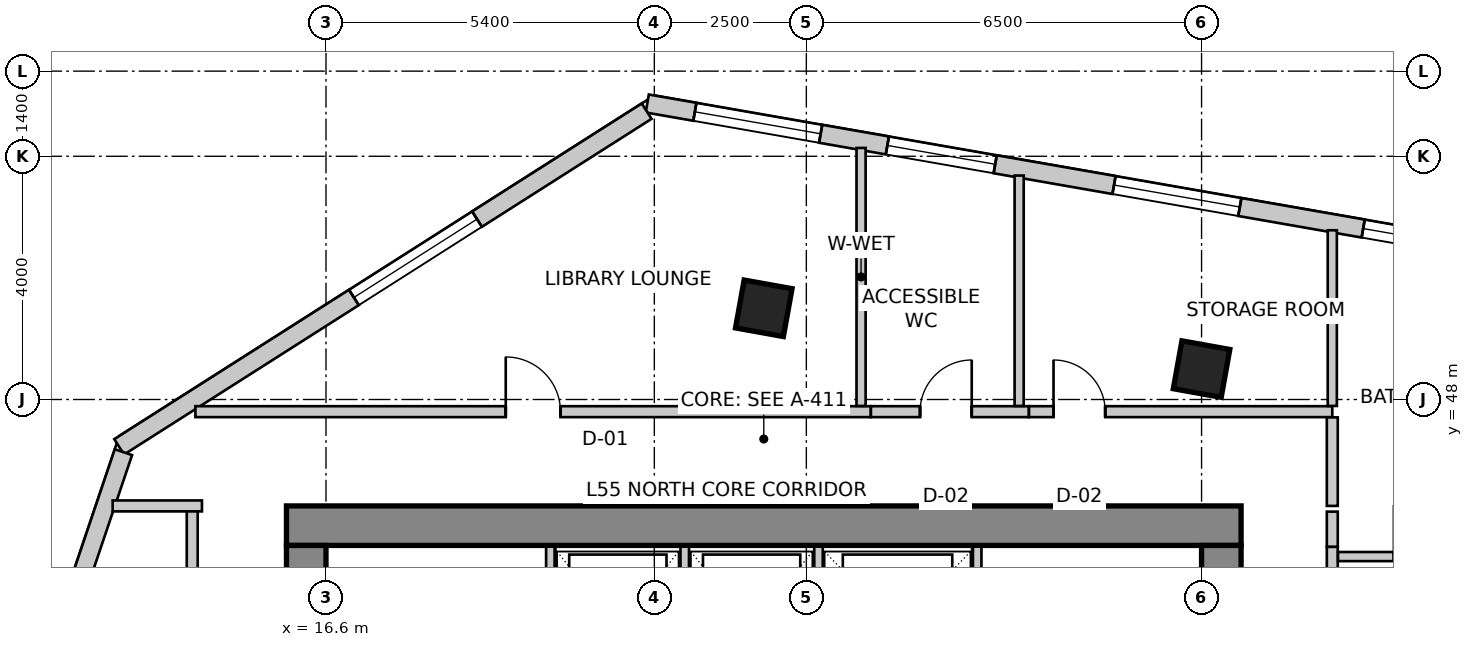
"""IFC4 building model, lengths in metres.
Left out: names, types, materials, properties, quantities, classifications, styles, units other than length and angle.
Written with IfcOpenShell. Run it as: python <this file> out.ifc"""

import sys

from ifc_helpers import new_model, si_unit, direction, frame, frame_2d, origin, origin_2d, place, context, subcontext, project, spatial, rectangle, extrude, source, transform, mapped, element, fill, save


model = new_model("IFC4")
c1 = context("Model", 3, precision=1e-05, world=origin(), true_north=direction((0.0, 1.0)))
c2 = subcontext(c1, "Body", "Model", "MODEL_VIEW")
j1 = project(units=[si_unit("LENGTHUNIT", "METRE"), si_unit("PLANEANGLEUNIT", "RADIAN")], contexts=[c1])
p1 = place(None, origin())
s1 = spatial("IfcSite", under=j1, at=p1, CompositionType="ELEMENT")
p2 = place(p1, origin())
s2 = spatial("IfcBuilding", under=s1, at=p2, CompositionType="ELEMENT")
p3 = place(p2, frame((0.0, 0.0, 218.4)))
s3 = spatial("IfcBuildingStorey", under=s2, at=p3, CompositionType="ELEMENT", Elevation=218.4)
p4 = place(p3, frame((15.95, 45.925, 0.0), z_axis=(0.0, 0.0, 1.0), x_axis=(1.0, 0.0, 0.0)))
e1 = element("IfcWall", 1, at=p4, inside=s3, PredefinedType="SHEAR", context=c2, shape_type="SweptSolid", body=[
    extrude(rectangle(XDim=15.7, YDim=0.65, at=frame_2d((7.85, 0.0))), origin(), (0.0, 0.0, 1.0), 3.5),
])
p5 = place(p3, frame((16.275, 34.2, 0.0), z_axis=(0.0, 0.0, 1.0), x_axis=(0.0, 1.0, 0.0)))
e2 = element("IfcWall", 2, at=p5, inside=s3, PredefinedType="SHEAR", context=c2, shape_type="SweptSolid", body=[
    extrude(rectangle(XDim=11.4, YDim=0.65, at=frame_2d((5.7, 0.0))), origin(), (0.0, 0.0, 1.0), 3.5),
])
m1 = source(origin(), c2, "Body", "SweptSolid", [
    extrude(rectangle(XDim=1.1, YDim=2.15, at=frame_2d((0.55, 1.075))), frame((0.0, 0.335, 0.0), z_axis=(0.0, -1.0, 0.0), x_axis=(1.0, 0.0, 0.0)), (0.0, 0.0, 1.0), 0.67),
])
p6 = place(p5, frame((7.15, 0.0, 0.0)))
e3 = element("IfcOpeningElement", 3, at=p6, cuts=e2, PredefinedType="OPENING", context=c2, shape_type="MappedRepresentation", body=[
    mapped(m1, transform((0.0, 0.0, 0.0), scale=1.0)),
])
p7 = place(p3, frame((31.325, 34.2, 0.0), z_axis=(0.0, 0.0, 1.0), x_axis=(0.0, 1.0, 0.0)))
e4 = element("IfcWall", 4, at=p7, inside=s3, PredefinedType="SHEAR", context=c2, shape_type="SweptSolid", body=[
    extrude(rectangle(XDim=11.4, YDim=0.65, at=frame_2d((5.7, 0.0))), origin(), (0.0, 0.0, 1.0), 3.5),
])
p8 = place(p7, frame((7.35, 0.0, 0.0)))
e5 = element("IfcOpeningElement", 5, at=p8, cuts=e4, PredefinedType="OPENING", context=c2, shape_type="MappedRepresentation", body=[
    mapped(m1, transform((0.0, 0.0, 0.0), scale=1.0)),
])
m2 = source(origin(), c2, "Body", "SweptSolid", [
    extrude(rectangle(XDim=0.8, YDim=0.8, at=origin_2d()), origin(), (0.0, 0.0, 1.0), 3.5),
])
for number, where, z_axis, x_axis in (
    (6, (23.8, 49.5, 0.0), (0.0, 0.0, 1.0), (0.984, -0.177, 0.0)),
    (7, (31.0, 48.5, 0.0), (0.0, 0.0, 1.0), (0.984, -0.177, 0.0)),
):
    element("IfcColumn", number, at=place(p3, frame(where, z_axis=z_axis, x_axis=x_axis)), inside=s3, PredefinedType="COLUMN", context=c2, shape_type="MappedRepresentation", body=[
        mapped(m2, transform((0.0, 0.0, 0.0), scale=1.0)),
    ])
p9 = place(p3, frame((43.561, 49.081, 0.0), z_axis=(0.0, 0.0, 1.0), x_axis=(-0.985083967494, 0.17207433564, 0.0)))
e8 = element("IfcWall", 8, at=p9, inside=s3, PredefinedType="SOLIDWALL", context=c2, shape_type="SweptSolid", body=[
    extrude(rectangle(XDim=22.006, YDim=0.3, at=frame_2d((11.003, 0.0))), origin(), (0.0, 0.0, 1.0), 3.25),
])
m3 = source(origin(), c2, "Body", "SweptSolid", [
    extrude(rectangle(XDim=2.1, YDim=2.0, at=frame_2d((1.05, 1.0))), frame((0.0, 0.16, 0.0), z_axis=(0.0, -1.0, 0.0), x_axis=(1.0, 0.0, 0.0)), (0.0, 0.0, 1.0), 0.32),
])
p10 = place(p9, frame((0.95, 0.0, 0.85)))
e9 = element("IfcOpeningElement", 9, at=p10, cuts=e8, PredefinedType="OPENING", context=c2, shape_type="MappedRepresentation", body=[
    mapped(m3, transform((0.0, 0.0, 0.0), scale=1.0)),
])
p11 = place(p9, frame((4.778, 0.0, 0.85)))
e10 = element("IfcOpeningElement", 10, at=p11, cuts=e8, PredefinedType="OPENING", context=c2, shape_type="MappedRepresentation", body=[
    mapped(m3, transform((0.0, 0.0, 0.0), scale=1.0)),
])
m4 = source(origin(), c2, "Body", "SweptSolid", [
    extrude(rectangle(XDim=1.8, YDim=2.1, at=frame_2d((0.9, 1.05))), frame((0.0, 0.16, 0.0), z_axis=(0.0, -1.0, 0.0), x_axis=(1.0, 0.0, 0.0)), (0.0, 0.0, 1.0), 0.32),
])
p12 = place(p9, frame((8.253, 0.0, 0.85)))
e11 = element("IfcOpeningElement", 11, at=p12, cuts=e8, PredefinedType="OPENING", context=c2, shape_type="MappedRepresentation", body=[
    mapped(m4, transform((0.0, 0.0, 0.0), scale=1.0)),
])
p13 = place(p9, frame((12.113, 0.0, 0.85)))
e12 = element("IfcOpeningElement", 12, at=p13, cuts=e8, PredefinedType="OPENING", context=c2, shape_type="MappedRepresentation", body=[
    mapped(m3, transform((0.0, 0.0, 0.0), scale=1.0)),
])
p14 = place(p9, frame((16.197, 0.0, 0.85)))
e13 = element("IfcOpeningElement", 13, at=p14, cuts=e8, PredefinedType="OPENING", context=c2, shape_type="MappedRepresentation", body=[
    mapped(m4, transform((0.0, 0.0, 0.0), scale=1.0)),
])
p15 = place(p9, frame((19.111, 0.0, 0.85)))
e14 = element("IfcOpeningElement", 14, at=p15, cuts=e8, PredefinedType="OPENING", context=c2, shape_type="MappedRepresentation", body=[
    mapped(m3, transform((0.0, 0.0, 0.0), scale=1.0)),
])
p16 = place(p3, frame((21.874, 52.742, 0.0), z_axis=(0.0, 0.0, 1.0), x_axis=(-0.84365659959, -0.536883173482, 0.0)))
e15 = element("IfcWall", 15, at=p16, inside=s3, PredefinedType="SOLIDWALL", context=c2, shape_type="SweptSolid", body=[
    extrude(rectangle(XDim=10.283, YDim=0.3, at=frame_2d((5.142, 0.0))), origin(), (0.0, 0.0, 1.0), 3.25),
])
m5 = source(origin(), c2, "Body", "SweptSolid", [
    extrude(rectangle(XDim=2.4, YDim=2.2, at=frame_2d((1.2, 1.1))), frame((0.0, 0.16, 0.0), z_axis=(0.0, -1.0, 0.0), x_axis=(1.0, 0.0, 0.0)), (0.0, 0.0, 1.0), 0.32),
])
p17 = place(p16, frame((3.307, 0.0, 0.85)))
e16 = element("IfcOpeningElement", 16, at=p17, cuts=e15, PredefinedType="OPENING", context=c2, shape_type="MappedRepresentation", body=[
    mapped(m5, transform((0.0, 0.0, 0.0), scale=1.0)),
])
p18 = place(p3, frame((13.269, 47.134, 0.0), z_axis=(0.0, 0.0, 1.0), x_axis=(-0.319920776449, -0.947444297464, 0.0)))
e17 = element("IfcWall", 17, at=p18, inside=s3, PredefinedType="SOLIDWALL", context=c2, shape_type="SweptSolid", body=[
    extrude(rectangle(XDim=16.133, YDim=0.3, at=frame_2d((8.067, 0.0))), origin(), (0.0, 0.0, 1.0), 3.25),
])
p19 = place(p18, frame((2.513, 0.0, 0.85)))
e18 = element("IfcOpeningElement", 18, at=p19, cuts=e17, PredefinedType="OPENING", context=c2, shape_type="MappedRepresentation", body=[
    mapped(m3, transform((0.0, 0.0, 0.0), scale=1.0)),
])
p20 = place(p18, frame((7.26, 0.0, 0.85)))
e19 = element("IfcOpeningElement", 19, at=p20, cuts=e17, PredefinedType="OPENING", context=c2, shape_type="MappedRepresentation", body=[
    mapped(m5, transform((0.0, 0.0, 0.0), scale=1.0)),
])
p21 = place(p18, frame((12.307, 0.0, 0.85)))
e20 = element("IfcOpeningElement", 20, at=p21, cuts=e17, PredefinedType="OPENING", context=c2, shape_type="MappedRepresentation", body=[
    mapped(m3, transform((0.0, 0.0, 0.0), scale=1.0)),
])
for number, where, z_axis, x_axis in (
    (21, (20.29, 43.28, 0.0), (0.0, 0.0, 1.0), (0.0, 1.0, 0.0)),
    (22, (27.31, 43.28, 0.0), (0.0, 0.0, 1.0), (0.0, 1.0, 0.0)),
):
    element("IfcWall", number, at=place(p3, frame(where, z_axis=z_axis, x_axis=x_axis)), inside=s3, PredefinedType="SOLIDWALL", context=c2, shape_type="SweptSolid", body=[
        extrude(rectangle(XDim=2.3, YDim=0.14, at=frame_2d((1.15, 0.0))), origin(), (0.0, 0.0, 1.0), 3.25),
    ])
for number, where, z_axis, x_axis in (
    (23, (22.5, 43.02, 0.0), (0.0, 0.0, 1.0), (0.0, 1.0, 0.0)),
    (24, (24.7, 43.02, 0.0), (0.0, 0.0, 1.0), (0.0, 1.0, 0.0)),
):
    element("IfcWall", number, at=place(p3, frame(where, z_axis=z_axis, x_axis=x_axis)), inside=s3, PredefinedType="SOLIDWALL", context=c2, shape_type="SweptSolid", body=[
        extrude(rectangle(XDim=2.56, YDim=0.14, at=frame_2d((1.28, 0.0))), origin(), (0.0, 0.0, 1.0), 3.25),
    ])
p22 = place(p3, frame((14.4, 33.644, 0.0), z_axis=(0.0, 0.0, 1.0), x_axis=(0.0, 1.0, 0.0)))
e25 = element("IfcWall", 25, at=p22, inside=s3, PredefinedType="PARTITIONING", context=c2, shape_type="SweptSolid", body=[
    extrude(rectangle(XDim=12.606, YDim=0.18, at=frame_2d((6.303, 0.0))), origin(), (0.0, 0.0, 1.0), 3.25),
])
m6 = source(origin(), c2, "Body", "SweptSolid", [
    extrude(rectangle(XDim=0.9, YDim=2.15, at=frame_2d((0.45, 1.075))), frame((0.0, 0.1, 0.0), z_axis=(0.0, -1.0, 0.0), x_axis=(1.0, 0.0, 0.0)), (0.0, 0.0, 1.0), 0.2),
])
p23 = place(p22, frame((4.399, 0.0, 0.0)))
e26 = element("IfcOpeningElement", 26, at=p23, cuts=e25, PredefinedType="OPENING", context=c2, shape_type="MappedRepresentation", body=[
    mapped(m6, transform((0.0, 0.0, 0.0), scale=1.0)),
])
p24 = place(p3, frame((14.56, 46.25, 0.0), z_axis=(0.0, 0.0, 1.0), x_axis=(-1.0, 0.0, 0.0)))
e27 = element("IfcWall", 27, at=p24, inside=s3, PredefinedType="PARTITIONING", context=c2, shape_type="SweptSolid", body=[
    extrude(rectangle(XDim=1.469, YDim=0.18, at=frame_2d((0.734, 0.0))), origin(), (0.0, 0.0, 1.0), 3.25),
])
p25 = place(p3, frame((14.453, 47.8, 0.0), z_axis=(0.0, 0.0, 1.0), x_axis=(1.0, 0.0, 0.0)))
e28 = element("IfcWall", 28, at=p25, inside=s3, PredefinedType="PARTITIONING", context=c2, shape_type="SweptSolid", body=[
    extrude(rectangle(XDim=11.107, YDim=0.18, at=frame_2d((5.554, 0.0))), origin(), (0.0, 0.0, 1.0), 2.919),
])
p26 = place(p25, frame((5.104, 0.0, 0.0)))
e29 = element("IfcOpeningElement", 29, at=p26, cuts=e28, PredefinedType="OPENING", context=c2, shape_type="MappedRepresentation", body=[
    mapped(m6, transform((0.0, 0.0, 0.0), scale=1.0)),
])
p27 = place(p3, frame((25.562, 47.8, 0.0), z_axis=(0.0, 0.0, 1.0), x_axis=(1.0, 0.0, 0.0)))
e30 = element("IfcWall", 30, at=p27, inside=s3, PredefinedType="PARTITIONING", context=c2, shape_type="SweptSolid", body=[
    extrude(rectangle(XDim=2.598, YDim=0.18, at=frame_2d((1.299, 0.0))), origin(), (0.0, 0.0, 1.0), 3.25),
])
m7 = source(origin(), c2, "Body", "SweptSolid", [
    extrude(rectangle(XDim=0.85, YDim=2.15, at=frame_2d((0.425, 1.075))), frame((0.0, 0.1, 0.0), z_axis=(0.0, -1.0, 0.0), x_axis=(1.0, 0.0, 0.0)), (0.0, 0.0, 1.0), 0.2),
])
p28 = place(p27, frame((0.808, 0.0, 0.0)))
e31 = element("IfcOpeningElement", 31, at=p28, cuts=e30, PredefinedType="OPENING", context=c2, shape_type="MappedRepresentation", body=[
    mapped(m7, transform((0.0, 0.0, 0.0), scale=1.0)),
])
p29 = place(p3, frame((28.162, 47.8, 0.0), z_axis=(0.0, 0.0, 1.0), x_axis=(1.0, 0.0, 0.0)))
e32 = element("IfcWall", 32, at=p29, inside=s3, PredefinedType="PARTITIONING", context=c2, shape_type="SweptSolid", body=[
    extrude(rectangle(XDim=4.988, YDim=0.18, at=frame_2d((2.494, 0.0))), origin(), (0.0, 0.0, 1.0), 2.779),
])
p30 = place(p29, frame((0.403, 0.0, 0.0)))
e33 = element("IfcOpeningElement", 33, at=p30, cuts=e32, PredefinedType="OPENING", context=c2, shape_type="MappedRepresentation", body=[
    mapped(m7, transform((0.0, 0.0, 0.0), scale=1.0)),
])
p31 = place(p3, frame((33.15, 47.706, 0.0), z_axis=(0.0, 0.0, 1.0), x_axis=(0.0, -1.0, 0.0)))
e34 = element("IfcWall", 34, at=p31, inside=s3, PredefinedType="PARTITIONING", context=c2, shape_type="SweptSolid", body=[
    extrude(rectangle(XDim=1.456, YDim=0.18, at=frame_2d((0.728, 0.0))), origin(), (0.0, 0.0, 1.0), 2.919),
])
p32 = place(p3, frame((33.15, 45.577, 0.0), z_axis=(0.0, 0.0, 1.0), x_axis=(0.0, -1.0, 0.0)))
e35 = element("IfcWall", 35, at=p32, inside=s3, PredefinedType="PARTITIONING", context=c2, shape_type="SweptSolid", body=[
    extrude(rectangle(XDim=5.687, YDim=0.18, at=frame_2d((2.844, 0.0))), origin(), (0.0, 0.0, 1.0), 2.779),
])
p33 = place(p3, frame((33.15, 46.156, 0.0), z_axis=(0.0, 0.0, 1.0), x_axis=(0.0, -1.0, 0.0)))
e36 = element("IfcWall", 36, at=p33, inside=s3, PredefinedType="PARTITIONING", context=c2, shape_type="SweptSolid", body=[
    extrude(rectangle(XDim=0.577, YDim=0.18, at=frame_2d((0.289, 0.0))), origin(), (0.0, 0.0, 1.0), 2.779),
])
p34 = place(p3, frame((25.4, 52.137, 0.0), z_axis=(0.0, 0.0, 1.0), x_axis=(0.0, -1.0, 0.0)))
e37 = element("IfcWall", 37, at=p34, inside=s3, PredefinedType="PARTITIONING", context=c2, shape_type="SweptSolid", body=[
    extrude(rectangle(XDim=4.243, YDim=0.15, at=frame_2d((2.122, 0.0))), origin(), (0.0, 0.0, 1.0), 2.542),
])
p35 = place(p3, frame((28.0, 51.683, 0.0), z_axis=(0.0, 0.0, 1.0), x_axis=(0.0, -1.0, 0.0)))
e38 = element("IfcWall", 38, at=p35, inside=s3, PredefinedType="PARTITIONING", context=c2, shape_type="SweptSolid", body=[
    extrude(rectangle(XDim=3.789, YDim=0.15, at=frame_2d((1.895, 0.0))), origin(), (0.0, 0.0, 1.0), 2.542),
])
p36 = place(p3, frame((33.15, 50.783, 0.0), z_axis=(0.0, 0.0, 1.0), x_axis=(0.0, -1.0, 0.0)))
e39 = element("IfcWall", 39, at=p36, inside=s3, PredefinedType="PARTITIONING", context=c2, shape_type="SweptSolid", body=[
    extrude(rectangle(XDim=2.889, YDim=0.15, at=frame_2d((1.445, 0.0))), origin(), (0.0, 0.0, 1.0), 2.542),
])
p37 = place(p3, frame((33.244, 45.417, 0.0), z_axis=(0.0, 0.0, 1.0), x_axis=(1.0, 0.0, 0.0)))
e40 = element("IfcWall", 40, at=p37, inside=s3, PredefinedType="PARTITIONING", context=c2, shape_type="SweptSolid", body=[
    extrude(rectangle(XDim=2.816, YDim=0.15, at=frame_2d((1.408, 0.0))), origin(), (0.0, 0.0, 1.0), 2.919),
])
m8 = source(origin(), c2, "Body", "SweptSolid", [
    extrude(rectangle(XDim=0.85, YDim=2.15, at=frame_2d((0.425, 1.075))), frame((0.0, 0.085, 0.0), z_axis=(0.0, -1.0, 0.0), x_axis=(1.0, 0.0, 0.0)), (0.0, 0.0, 1.0), 0.17),
])
p38 = place(p37, frame((0.919, 0.0, 0.0)))
e41 = element("IfcOpeningElement", 41, at=p38, cuts=e40, PredefinedType="OPENING", context=c2, shape_type="MappedRepresentation", body=[
    mapped(m8, transform((0.0, 0.0, 0.0), scale=1.0)),
])
m9 = source(origin(), c2, "Body", "SweptSolid", [
    extrude(rectangle(XDim=1.8, YDim=2.1, at=frame_2d((0.9, 1.05))), frame((0.0, -0.015, 0.0), z_axis=(0.0, -1.0, 0.0), x_axis=(1.0, 0.0, 0.0)), (0.0, 0.0, 1.0), 0.06),
])
p39 = place(p12, origin())
e42 = element("IfcWindow", 42, at=p39, inside=s3, PartitioningType="SINGLE_PANEL", PredefinedType="WINDOW", context=c2, shape_type="MappedRepresentation", body=[
    mapped(m9, transform((0.0, 0.0, 0.0), scale=1.0)),
])
fill(e11, e42)
m10 = source(origin(), c2, "Body", "SweptSolid", [
    extrude(rectangle(XDim=2.1, YDim=2.0, at=frame_2d((1.05, 1.0))), frame((0.0, -0.015, 0.0), z_axis=(0.0, -1.0, 0.0), x_axis=(1.0, 0.0, 0.0)), (0.0, 0.0, 1.0), 0.06),
])
p40 = place(p13, origin())
e43 = element("IfcWindow", 43, at=p40, inside=s3, PartitioningType="SINGLE_PANEL", PredefinedType="WINDOW", context=c2, shape_type="MappedRepresentation", body=[
    mapped(m10, transform((0.0, 0.0, 0.0), scale=1.0)),
])
fill(e12, e43)
p41 = place(p14, origin())
e44 = element("IfcWindow", 44, at=p41, inside=s3, PartitioningType="SINGLE_PANEL", PredefinedType="WINDOW", context=c2, shape_type="MappedRepresentation", body=[
    mapped(m9, transform((0.0, 0.0, 0.0), scale=1.0)),
])
fill(e13, e44)
p42 = place(p15, origin())
e45 = element("IfcWindow", 45, at=p42, inside=s3, PartitioningType="SINGLE_PANEL", PredefinedType="WINDOW", context=c2, shape_type="MappedRepresentation", body=[
    mapped(m10, transform((0.0, 0.0, 0.0), scale=1.0)),
])
fill(e14, e45)
m11 = source(origin(), c2, "Body", "SweptSolid", [
    extrude(rectangle(XDim=2.4, YDim=2.2, at=frame_2d((1.2, 1.1))), frame((0.0, -0.015, 0.0), z_axis=(0.0, -1.0, 0.0), x_axis=(1.0, 0.0, 0.0)), (0.0, 0.0, 1.0), 0.06),
])
p43 = place(p17, origin())
e46 = element("IfcWindow", 46, at=p43, inside=s3, PartitioningType="SINGLE_PANEL", PredefinedType="WINDOW", context=c2, shape_type="MappedRepresentation", body=[
    mapped(m11, transform((0.0, 0.0, 0.0), scale=1.0)),
])
fill(e16, e46)
m12 = source(origin(), c2, "Body", "SweptSolid", [
    extrude(rectangle(XDim=0.9, YDim=2.15, at=frame_2d((0.45, 1.075))), frame((0.0, 0.025, 0.0), z_axis=(0.0, -1.0, 0.0), x_axis=(1.0, 0.0, 0.0)), (0.0, 0.0, 1.0), 0.05),
])
p44 = place(p26, origin())
e47 = element("IfcDoor", 47, at=p44, inside=s3, OperationType="SINGLE_SWING_LEFT", PredefinedType="DOOR", context=c2, shape_type="MappedRepresentation", body=[
    mapped(m12, transform((0.0, 0.0, 0.0), scale=1.0)),
])
fill(e29, e47)
m13 = source(origin(), c2, "Body", "SweptSolid", [
    extrude(rectangle(XDim=0.85, YDim=2.15, at=frame_2d((0.425, 1.075))), frame((0.0, 0.025, 0.0), z_axis=(0.0, -1.0, 0.0), x_axis=(1.0, 0.0, 0.0)), (0.0, 0.0, 1.0), 0.05),
])
p45 = place(p28, origin())
e48 = element("IfcDoor", 48, at=p45, inside=s3, OperationType="SINGLE_SWING_RIGHT", PredefinedType="DOOR", context=c2, shape_type="MappedRepresentation", body=[
    mapped(m13, transform((0.0, 0.0, 0.0), scale=1.0)),
])
fill(e31, e48)
p46 = place(p30, origin())
e49 = element("IfcDoor", 49, at=p46, inside=s3, OperationType="SINGLE_SWING_LEFT", PredefinedType="DOOR", context=c2, shape_type="MappedRepresentation", body=[
    mapped(m13, transform((0.0, 0.0, 0.0), scale=1.0)),
])
fill(e33, e49)
save(model, sys.argv[1])
